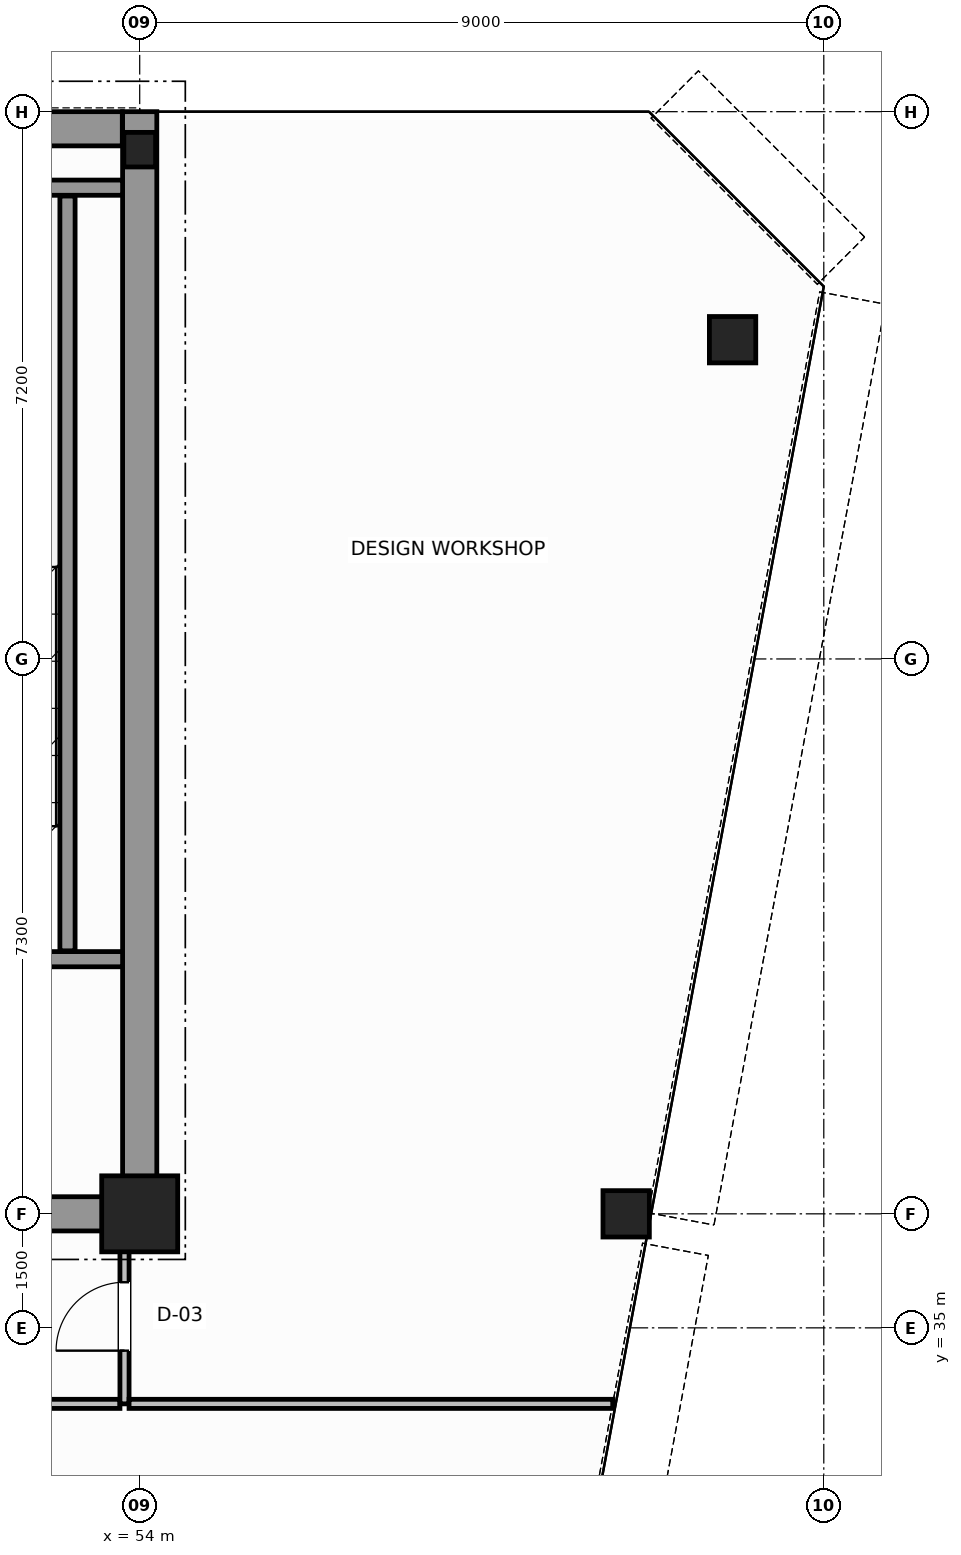
"""IFC4 building model, lengths in metres.
Left out: names, types, materials, properties, quantities, classifications, styles, units other than length and angle.
Written with IfcOpenShell. Run it as: python <this file> out.ifc"""

import sys

from ifc_helpers import new_model, si_unit, direction, frame, frame_2d, origin, origin_2d, place, context, subcontext, project, spatial, rectangle, hollow_circle, i_section, extrude, source, transform, mapped, element, fill, save


model = new_model("IFC4")
c1 = context("Model", 3, precision=1e-05, world=origin(), true_north=direction((0.0, 1.0)))
c2 = subcontext(c1, "Body", "Model", "MODEL_VIEW")
j1 = project(units=[si_unit("LENGTHUNIT", "METRE"), si_unit("PLANEANGLEUNIT", "RADIAN")], contexts=[c1])
p1 = place(None, origin())
s1 = spatial("IfcSite", under=j1, at=p1, CompositionType="ELEMENT")
p2 = place(p1, origin())
s2 = spatial("IfcBuilding", under=s1, at=p2, CompositionType="ELEMENT")
p3 = place(p2, frame((0.0, 0.0, 257.4)))
s3 = spatial("IfcBuildingStorey", under=s2, at=p3, CompositionType="ELEMENT", Elevation=257.4)
m1 = source(origin(), c2, "Body", "SweptSolid", [
    extrude(rectangle(XDim=1.0, YDim=1.0, at=origin_2d()), origin(), (0.0, 0.0, 1.0), 3.8),
])
p4 = place(p3, frame((54.0, 36.5, 0.0), z_axis=(0.0, 0.0, 1.0), x_axis=(1.0, 0.0, 0.0)))
e1 = element("IfcColumn", 1, at=p4, inside=s3, PredefinedType="COLUMN", context=c2, shape_type="MappedRepresentation", body=[
    mapped(m1, transform((0.0, 0.0, 0.0), scale=1.0)),
])
m2 = source(origin(), c2, "Body", "SweptSolid", [
    extrude(i_section(OverallWidth=0.418, OverallDepth=0.455, WebThickness=0.042, FlangeThickness=0.058, FilletRadius=0.015, at=origin_2d()), origin(), (0.0, 0.0, 1.0), 3.8),
])
p5 = place(p3, frame((54.0, 50.5, 0.0), z_axis=(0.0, 0.0, 1.0), x_axis=(1.0, 0.0, 0.0)))
e2 = element("IfcColumn", 2, at=p5, inside=s3, PredefinedType="COLUMN", context=c2, shape_type="MappedRepresentation", body=[
    mapped(m2, transform((0.0, 0.0, 0.0), scale=1.0)),
])
m3 = source(origin(), c2, "Body", "SweptSolid", [
    extrude(hollow_circle(Radius=0.305, WallThickness=0.03, at=origin_2d()), origin(), (0.0, 0.0, 1.0), 3.8),
])
for number, where, z_axis, x_axis in (
    (3, (61.8, 48.0, 0.0), (0.0, 0.0, 1.0), (1.0, 0.0, 0.0)),
    (4, (60.4, 36.5, 0.0), (0.0, 0.0, 1.0), (1.0, 0.0, 0.0)),
):
    element("IfcColumn", number, at=place(p3, frame(where, z_axis=z_axis, x_axis=x_axis)), inside=s3, PredefinedType="COLUMN", context=c2, shape_type="MappedRepresentation", body=[
        mapped(m3, transform((0.0, 0.0, 0.0), scale=1.0)),
    ])
p6 = place(p3, frame((34.002, 50.775, 0.0), z_axis=(0.0, 0.0, 1.0), x_axis=(1.0, 0.0, 0.0)))
e5 = element("IfcWall", 5, at=p6, inside=s3, PredefinedType="SHEAR", context=c2, shape_type="SweptSolid", body=[
    extrude(rectangle(XDim=19.769, YDim=0.45, at=frame_2d((9.885, 0.0))), origin(), (0.0, 0.0, 1.0), 3.8),
])
p7 = place(p3, frame((54.0, 36.5, 0.0), z_axis=(0.0, 0.0, 1.0), x_axis=(0.0, 1.0, 0.0)))
e6 = element("IfcWall", 6, at=p7, inside=s3, PredefinedType="SHEAR", context=c2, shape_type="SweptSolid", body=[
    extrude(rectangle(XDim=14.5, YDim=0.45, at=frame_2d((7.25, 0.0))), origin(), (0.0, 0.0, 1.0), 3.8),
])
p8 = place(p3, frame((49.8, 36.5, 0.0), z_axis=(0.0, 0.0, 1.0), x_axis=(1.0, 0.0, 0.0)))
e7 = element("IfcWall", 7, at=p8, inside=s3, PredefinedType="SHEAR", context=c2, shape_type="SweptSolid", body=[
    extrude(rectangle(XDim=3.955, YDim=0.45, at=frame_2d((1.978, 0.0))), origin(), (0.0, 0.0, 1.0), 2.58),
])
p9 = place(p3, frame((49.4, 39.85, 0.0), z_axis=(0.0, 0.0, 1.0), x_axis=(1.0, 0.0, 0.0)))
e8 = element("IfcWall", 8, at=p9, inside=s3, PredefinedType="SOLIDWALL", context=c2, shape_type="SweptSolid", body=[
    extrude(rectangle(XDim=4.375, YDim=0.2, at=frame_2d((2.188, 0.0))), origin(), (0.0, 0.0, 1.0), 3.8),
])
p10 = place(p9, frame((1.325, 0.0, 0.0)))
e9 = element("IfcOpeningElement", 9, at=p10, cuts=e8, PredefinedType="OPENING", context=c2, shape_type="SweptSolid", body=[
    extrude(rectangle(XDim=1.1, YDim=2.15, at=frame_2d((0.55, 1.075))), frame((0.0, 0.11, 0.0), z_axis=(0.0, -1.0, 0.0), x_axis=(1.0, 0.0, 0.0)), (0.0, 0.0, 1.0), 0.22),
])
p11 = place(p3, frame((49.4, 50.0, 0.0), z_axis=(0.0, 0.0, 1.0), x_axis=(1.0, 0.0, 0.0)))
e10 = element("IfcWall", 10, at=p11, inside=s3, PredefinedType="SOLIDWALL", context=c2, shape_type="SweptSolid", body=[
    extrude(rectangle(XDim=4.375, YDim=0.2, at=frame_2d((2.188, 0.0))), origin(), (0.0, 0.0, 1.0), 3.8),
])
p12 = place(p3, frame((53.05, 39.96, 0.0), z_axis=(0.0, 0.0, 1.0), x_axis=(0.0, 1.0, 0.0)))
e11 = element("IfcWall", 11, at=p12, inside=s3, PredefinedType="SOLIDWALL", context=c2, shape_type="SweptSolid", body=[
    extrude(rectangle(XDim=9.93, YDim=0.2, at=frame_2d((4.965, 0.0))), origin(), (0.0, 0.0, 1.0), 3.8),
])
p13 = place(p3, frame((36.26, 34.0, 0.0), z_axis=(0.0, 0.0, 1.0), x_axis=(1.0, 0.0, 0.0)))
e12 = element("IfcWall", 12, at=p13, inside=s3, PredefinedType="PARTITIONING", context=c2, shape_type="SweptSolid", body=[
    extrude(rectangle(XDim=17.48, YDim=0.12, at=frame_2d((8.74, 0.0))), origin(), (0.0, 0.0, 1.0), 3.17),
])
p14 = place(p3, frame((53.8, 34.0, 0.0), z_axis=(0.0, 0.0, 1.0), x_axis=(0.0, 1.0, 0.0)))
e13 = element("IfcWall", 13, at=p14, inside=s3, PredefinedType="PARTITIONING", context=c2, shape_type="SweptSolid", body=[
    extrude(rectangle(XDim=2.44, YDim=0.12, at=frame_2d((1.22, 0.0))), origin(), (0.0, 0.0, 1.0), 3.58),
])
p15 = place(p14, frame((0.7, 0.0, 0.0)))
e14 = element("IfcOpeningElement", 14, at=p15, cuts=e13, PredefinedType="OPENING", context=c2, shape_type="SweptSolid", body=[
    extrude(rectangle(XDim=0.9, YDim=2.15, at=frame_2d((0.45, 1.075))), frame((0.0, 0.07, 0.0), z_axis=(0.0, -1.0, 0.0), x_axis=(1.0, 0.0, 0.0)), (0.0, 0.0, 1.0), 0.14),
])
p16 = place(p3, frame((53.86, 34.0, 0.0), z_axis=(0.0, 0.0, 1.0), x_axis=(1.0, 0.0, 0.0)))
e15 = element("IfcWall", 15, at=p16, inside=s3, PredefinedType="PARTITIONING", context=c2, shape_type="SweptSolid", body=[
    extrude(rectangle(XDim=6.363, YDim=0.12, at=frame_2d((3.181, 0.0))), origin(), (0.0, 0.0, 1.0), 3.17),
])
m4 = source(origin(), c2, "Body", "SweptSolid", [
    extrude(rectangle(XDim=0.9, YDim=2.15, at=frame_2d((0.45, 1.075))), frame((0.0, 0.025, 0.0), z_axis=(0.0, -1.0, 0.0), x_axis=(1.0, 0.0, 0.0)), (0.0, 0.0, 1.0), 0.05),
])
p17 = place(p15, origin())
e16 = element("IfcDoor", 16, at=p17, inside=s3, OperationType="SINGLE_SWING_RIGHT", PredefinedType="DOOR", context=c2, shape_type="MappedRepresentation", body=[
    mapped(m4, transform((0.0, 0.0, 0.0), scale=1.0)),
])
fill(e14, e16)
save(model, sys.argv[1])
